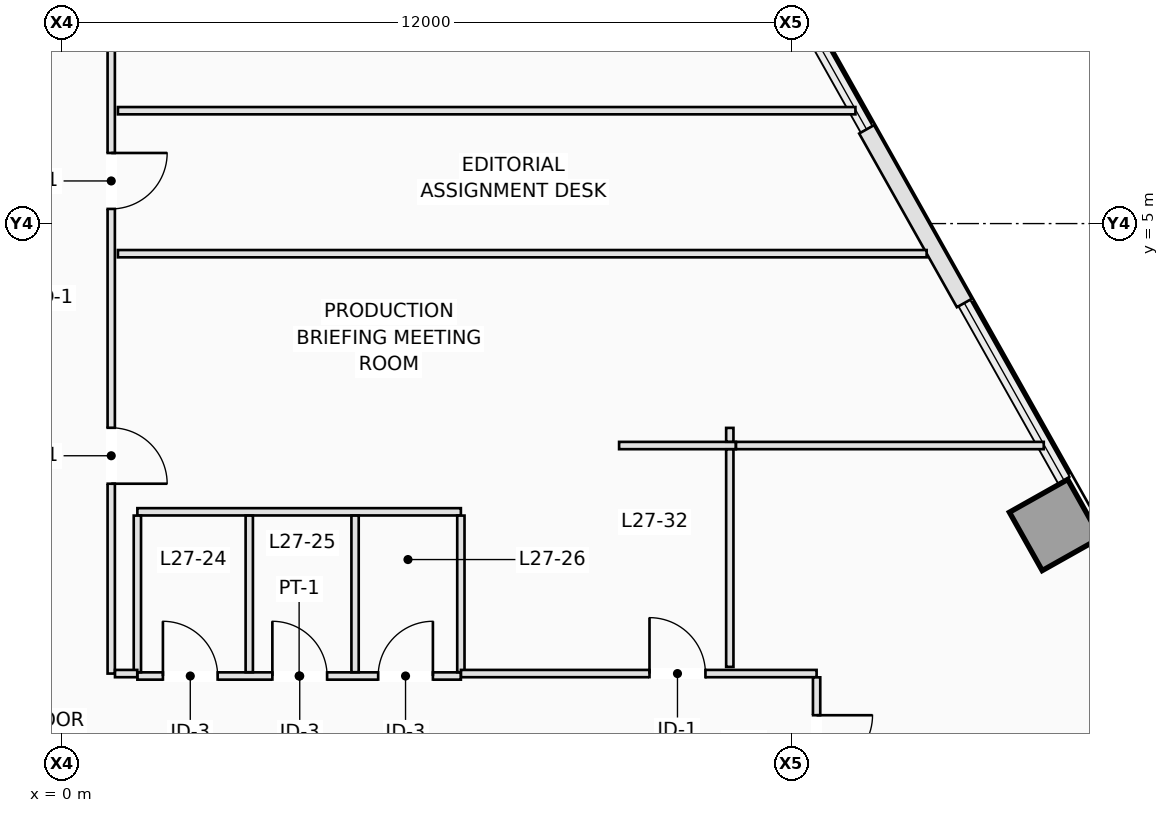
"""IFC4 building model, lengths in metres.
Left out: names, types, materials, properties, quantities, classifications, styles, units other than length and angle.
Written with IfcOpenShell. Run it as: python <this file> out.ifc"""

import sys

from ifc_helpers import new_model, si_unit, direction, frame, frame_2d, origin, origin_2d, place, context, subcontext, project, spatial, rectangle, extrude, element, fill, save


model = new_model("IFC4")
c1 = context("Model", 3, precision=1e-05, world=origin(), true_north=direction((0.0, 1.0)))
c2 = subcontext(c1, "Body", "Model", "MODEL_VIEW")
j1 = project(units=[si_unit("LENGTHUNIT", "METRE"), si_unit("PLANEANGLEUNIT", "RADIAN")], contexts=[c1])
p1 = place(None, origin())
s1 = spatial("IfcSite", under=j1, at=p1, CompositionType="ELEMENT")
p2 = place(p1, origin())
s2 = spatial("IfcBuilding", under=s1, at=p2, CompositionType="ELEMENT")
p3 = place(p2, frame((0.0, 0.0, 102.0)))
s3 = spatial("IfcBuildingStorey", under=s2, at=p3, CompositionType="ELEMENT", Elevation=102.0)
p4 = place(p3, frame((16.33, 0.043, 0.0), z_axis=(0.0, 0.0, 1.0), x_axis=(0.871575139605, 0.490261946333, 0.0)))
e1 = element("IfcColumn", 1, at=p4, inside=s3, PredefinedType="COLUMN", context=c2, shape_type="SweptSolid", body=[
    extrude(rectangle(XDim=1.1, YDim=1.1, at=origin_2d()), origin(), (0.0, 0.0, 1.0), 3.5),
])
p5 = place(p3, frame((13.232, 6.55, 0.0), z_axis=(0.0, 0.0, 1.0), x_axis=(0.490310760781, -0.871547679626, 0.0)))
e2 = element("IfcWall", 2, at=p5, inside=s3, PredefinedType="STANDARD", context=c2, shape_type="SweptSolid", body=[
    extrude(rectangle(XDim=3.277, YDim=0.28, at=frame_2d((1.638, 0.0))), origin(), (0.0, 0.0, 1.0), 3.25),
])
p6 = place(p3, frame((1.24, -2.44, 0.0), z_axis=(0.0, 0.0, 1.0), x_axis=(1.0, 0.0, 0.0)))
e3 = element("IfcWall", 3, at=p6, inside=s3, PredefinedType="PARTITIONING", context=c2, shape_type="SweptSolid", body=[
    extrude(rectangle(XDim=5.32, YDim=0.12, at=frame_2d((2.66, 0.0))), origin(), (0.0, 0.0, 1.0), 3.25),
])
p7 = place(p6, frame((0.42, 0.0, 0.0)))
e4 = element("IfcOpeningElement", 4, at=p7, cuts=e3, PredefinedType="OPENING", context=c2, shape_type="SweptSolid", body=[
    extrude(rectangle(XDim=0.9, YDim=2.12, at=frame_2d((0.45, 1.06))), frame((0.0, 0.07, 0.0), z_axis=(0.0, -1.0, 0.0), x_axis=(1.0, 0.0, 0.0)), (0.0, 0.0, 1.0), 0.14),
])
p8 = place(p6, frame((2.22, 0.0, 0.0)))
e5 = element("IfcOpeningElement", 5, at=p8, cuts=e3, PredefinedType="OPENING", context=c2, shape_type="SweptSolid", body=[
    extrude(rectangle(XDim=0.9, YDim=2.12, at=frame_2d((0.45, 1.06))), frame((0.0, 0.07, 0.0), z_axis=(0.0, -1.0, 0.0), x_axis=(1.0, 0.0, 0.0)), (0.0, 0.0, 1.0), 0.14),
])
p9 = place(p6, frame((3.96, 0.0, 0.0)))
e6 = element("IfcOpeningElement", 6, at=p9, cuts=e3, PredefinedType="OPENING", context=c2, shape_type="SweptSolid", body=[
    extrude(rectangle(XDim=0.9, YDim=2.12, at=frame_2d((0.45, 1.06))), frame((0.0, 0.07, 0.0), z_axis=(0.0, -1.0, 0.0), x_axis=(1.0, 0.0, 0.0)), (0.0, 0.0, 1.0), 0.14),
])
p10 = place(p3, frame((1.24, 0.26, 0.0), z_axis=(0.0, 0.0, 1.0), x_axis=(1.0, 0.0, 0.0)))
e7 = element("IfcWall", 7, at=p10, inside=s3, PredefinedType="PARTITIONING", context=c2, shape_type="SweptSolid", body=[
    extrude(rectangle(XDim=5.32, YDim=0.12, at=frame_2d((2.66, 0.0))), origin(), (0.0, 0.0, 1.0), 2.891),
])
for number, where, z_axis, x_axis in (
    (8, (1.24, -2.378, 0.0), (0.0, 0.0, 1.0), (0.0, 1.0, 0.0)),
    (9, (3.08, -2.378, 0.0), (0.0, 0.0, 1.0), (0.0, 1.0, 0.0)),
    (10, (4.82, -2.378, 0.0), (0.0, 0.0, 1.0), (0.0, 1.0, 0.0)),
    (11, (6.56, -2.378, 0.0), (0.0, 0.0, 1.0), (0.0, 1.0, 0.0)),
):
    element("IfcWall", number, at=place(p3, frame(where, z_axis=z_axis, x_axis=x_axis)), inside=s3, PredefinedType="PARTITIONING", context=c2, shape_type="SweptSolid", body=[
        extrude(rectangle(XDim=2.576, YDim=0.12, at=frame_2d((1.288, 0.0))), origin(), (0.0, 0.0, 1.0), 3.25),
    ])
p11 = place(p3, frame((0.81, 11.488, 0.0), z_axis=(0.0, 0.0, 1.0), x_axis=(0.0, -1.0, 0.0)))
e12 = element("IfcWall", 12, at=p11, inside=s3, PredefinedType="PARTITIONING", context=c2, shape_type="SweptSolid", body=[
    extrude(rectangle(XDim=13.888, YDim=0.12, at=frame_2d((6.944, 0.0))), origin(), (0.0, 0.0, 1.0), 3.25),
])
p12 = place(p11, frame((5.327, 0.0, 0.0)))
e13 = element("IfcOpeningElement", 13, at=p12, cuts=e12, PredefinedType="OPENING", context=c2, shape_type="SweptSolid", body=[
    extrude(rectangle(XDim=0.92, YDim=2.12, at=frame_2d((0.46, 1.06))), frame((0.0, 0.07, 0.0), z_axis=(0.0, -1.0, 0.0), x_axis=(1.0, 0.0, 0.0)), (0.0, 0.0, 1.0), 0.14),
])
p13 = place(p11, frame((9.846, 0.0, 0.0)))
e14 = element("IfcOpeningElement", 14, at=p13, cuts=e12, PredefinedType="OPENING", context=c2, shape_type="SweptSolid", body=[
    extrude(rectangle(XDim=0.92, YDim=2.12, at=frame_2d((0.46, 1.06))), frame((0.0, 0.07, 0.0), z_axis=(0.0, -1.0, 0.0), x_axis=(1.0, 0.0, 0.0)), (0.0, 0.0, 1.0), 0.14),
])
p14 = place(p3, frame((0.872, -2.4, 0.0), z_axis=(0.0, 0.0, 1.0), x_axis=(1.0, 0.0, 0.0)))
e15 = element("IfcWall", 15, at=p14, inside=s3, PredefinedType="PARTITIONING", context=c2, shape_type="SweptSolid", body=[
    extrude(rectangle(XDim=0.366, YDim=0.12, at=frame_2d((0.183, 0.0))), origin(), (0.0, 0.0, 1.0), 3.25),
])
p15 = place(p3, frame((6.562, -2.4, 0.0), z_axis=(0.0, 0.0, 1.0), x_axis=(1.0, 0.0, 0.0)))
e16 = element("IfcWall", 16, at=p15, inside=s3, PredefinedType="PARTITIONING", context=c2, shape_type="SweptSolid", body=[
    extrude(rectangle(XDim=5.848, YDim=0.12, at=frame_2d((2.924, 0.0))), origin(), (0.0, 0.0, 1.0), 3.25),
])
p16 = place(p15, frame((3.1, 0.0, 0.0)))
e17 = element("IfcOpeningElement", 17, at=p16, cuts=e16, PredefinedType="OPENING", context=c2, shape_type="SweptSolid", body=[
    extrude(rectangle(XDim=0.92, YDim=2.12, at=frame_2d((0.46, 1.06))), frame((0.0, 0.07, 0.0), z_axis=(0.0, -1.0, 0.0), x_axis=(1.0, 0.0, 0.0)), (0.0, 0.0, 1.0), 0.14),
])
p17 = place(p3, frame((12.41, -2.462, 0.0), z_axis=(0.0, 0.0, 1.0), x_axis=(0.0, -1.0, 0.0)))
e18 = element("IfcWall", 18, at=p17, inside=s3, PredefinedType="PARTITIONING", context=c2, shape_type="SweptSolid", body=[
    extrude(rectangle(XDim=1.786, YDim=0.12, at=frame_2d((0.893, 0.0))), origin(), (0.0, 0.0, 1.0), 3.25),
])
p18 = place(p17, frame((0.623, 0.0, 0.0)))
e19 = element("IfcOpeningElement", 19, at=p18, cuts=e18, PredefinedType="OPENING", context=c2, shape_type="SweptSolid", body=[
    extrude(rectangle(XDim=0.92, YDim=2.12, at=frame_2d((0.46, 1.06))), frame((0.0, 0.07, 0.0), z_axis=(0.0, -1.0, 0.0), x_axis=(1.0, 0.0, 0.0)), (0.0, 0.0, 1.0), 0.14),
])
p19 = place(p3, frame((13.048, 6.856, 0.0), z_axis=(0.0, 0.0, 1.0), x_axis=(-1.0, 0.0, 0.0)))
e20 = element("IfcWall", 20, at=p19, inside=s3, PredefinedType="PARTITIONING", context=c2, shape_type="SweptSolid", body=[
    extrude(rectangle(XDim=12.128, YDim=0.12, at=frame_2d((6.064, 0.0))), origin(), (0.0, 0.0, 1.0), 3.25),
])
p20 = place(p3, frame((14.219, 4.505, 0.0), z_axis=(0.0, 0.0, 1.0), x_axis=(-1.0, 0.0, 0.0)))
e21 = element("IfcWall", 21, at=p20, inside=s3, PredefinedType="PARTITIONING", context=c2, shape_type="SweptSolid", body=[
    extrude(rectangle(XDim=13.3, YDim=0.12, at=frame_2d((6.65, 0.0))), origin(), (0.0, 0.0, 1.0), 3.25),
])
p21 = place(p3, frame((11.083, 1.35, 0.0), z_axis=(0.0, 0.0, 1.0), x_axis=(-1.0, 0.0, 0.0)))
e22 = element("IfcWall", 22, at=p21, inside=s3, PredefinedType="PARTITIONING", context=c2, shape_type="SweptSolid", body=[
    extrude(rectangle(XDim=1.92, YDim=0.12, at=frame_2d((0.96, 0.0))), origin(), (0.0, 0.0, 1.0), 3.25),
])
p22 = place(p3, frame((16.146, 1.35, 0.0), z_axis=(0.0, 0.0, 1.0), x_axis=(-1.0, 0.0, 0.0)))
e23 = element("IfcWall", 23, at=p22, inside=s3, PredefinedType="PARTITIONING", context=c2, shape_type="SweptSolid", body=[
    extrude(rectangle(XDim=5.061, YDim=0.12, at=frame_2d((2.531, 0.0))), origin(), (0.0, 0.0, 1.0), 3.25),
])
p23 = place(p3, frame((10.982, 1.64, 0.0), z_axis=(0.0, 0.0, 1.0), x_axis=(0.0, -1.0, 0.0)))
e24 = element("IfcWall", 24, at=p23, inside=s3, PredefinedType="PARTITIONING", context=c2, shape_type="SweptSolid", body=[
    extrude(rectangle(XDim=0.228, YDim=0.12, at=frame_2d((0.114, 0.0))), origin(), (0.0, 0.0, 1.0), 3.25),
])
p24 = place(p3, frame((10.982, 1.288, 0.0), z_axis=(0.0, 0.0, 1.0), x_axis=(0.0, -1.0, 0.0)))
e25 = element("IfcWall", 25, at=p24, inside=s3, PredefinedType="PARTITIONING", context=c2, shape_type="SweptSolid", body=[
    extrude(rectangle(XDim=3.578, YDim=0.12, at=frame_2d((1.789, 0.0))), origin(), (0.0, 0.0, 1.0), 3.25),
])
p25 = place(p7, origin())
e26 = element("IfcDoor", 26, at=p25, inside=s3, OperationType="SINGLE_SWING_LEFT", PredefinedType="DOOR", context=c2, shape_type="SweptSolid", body=[
    extrude(rectangle(XDim=0.9, YDim=2.12, at=frame_2d((0.45, 1.06))), frame((0.0, 0.025, 0.0), z_axis=(0.0, -1.0, 0.0), x_axis=(1.0, 0.0, 0.0)), (0.0, 0.0, 1.0), 0.05),
])
fill(e4, e26)
p26 = place(p8, origin())
e27 = element("IfcDoor", 27, at=p26, inside=s3, OperationType="SINGLE_SWING_LEFT", PredefinedType="DOOR", context=c2, shape_type="SweptSolid", body=[
    extrude(rectangle(XDim=0.9, YDim=2.12, at=frame_2d((0.45, 1.06))), frame((0.0, 0.025, 0.0), z_axis=(0.0, -1.0, 0.0), x_axis=(1.0, 0.0, 0.0)), (0.0, 0.0, 1.0), 0.05),
])
fill(e5, e27)
p27 = place(p9, origin())
e28 = element("IfcDoor", 28, at=p27, inside=s3, OperationType="SINGLE_SWING_RIGHT", PredefinedType="DOOR", context=c2, shape_type="SweptSolid", body=[
    extrude(rectangle(XDim=0.9, YDim=2.12, at=frame_2d((0.45, 1.06))), frame((0.0, 0.025, 0.0), z_axis=(0.0, -1.0, 0.0), x_axis=(1.0, 0.0, 0.0)), (0.0, 0.0, 1.0), 0.05),
])
fill(e6, e28)
p28 = place(p12, origin())
e29 = element("IfcDoor", 29, at=p28, inside=s3, OperationType="SINGLE_SWING_LEFT", PredefinedType="DOOR", context=c2, shape_type="SweptSolid", body=[
    extrude(rectangle(XDim=0.92, YDim=2.12, at=frame_2d((0.46, 1.06))), frame((0.0, 0.025, 0.0), z_axis=(0.0, -1.0, 0.0), x_axis=(1.0, 0.0, 0.0)), (0.0, 0.0, 1.0), 0.05),
])
fill(e13, e29)
p29 = place(p13, origin())
e30 = element("IfcDoor", 30, at=p29, inside=s3, OperationType="SINGLE_SWING_RIGHT", PredefinedType="DOOR", context=c2, shape_type="SweptSolid", body=[
    extrude(rectangle(XDim=0.92, YDim=2.12, at=frame_2d((0.46, 1.06))), frame((0.0, 0.025, 0.0), z_axis=(0.0, -1.0, 0.0), x_axis=(1.0, 0.0, 0.0)), (0.0, 0.0, 1.0), 0.05),
])
fill(e14, e30)
p30 = place(p16, origin())
e31 = element("IfcDoor", 31, at=p30, inside=s3, OperationType="SINGLE_SWING_LEFT", PredefinedType="DOOR", context=c2, shape_type="SweptSolid", body=[
    extrude(rectangle(XDim=0.92, YDim=2.12, at=frame_2d((0.46, 1.06))), frame((0.0, 0.025, 0.0), z_axis=(0.0, -1.0, 0.0), x_axis=(1.0, 0.0, 0.0)), (0.0, 0.0, 1.0), 0.05),
])
fill(e17, e31)
p31 = place(p18, origin())
e32 = element("IfcDoor", 32, at=p31, inside=s3, OperationType="SINGLE_SWING_LEFT", PredefinedType="DOOR", context=c2, shape_type="SweptSolid", body=[
    extrude(rectangle(XDim=0.92, YDim=2.12, at=frame_2d((0.46, 1.06))), frame((0.0, 0.025, 0.0), z_axis=(0.0, -1.0, 0.0), x_axis=(1.0, 0.0, 0.0)), (0.0, 0.0, 1.0), 0.05),
])
fill(e19, e32)
save(model, sys.argv[1])
